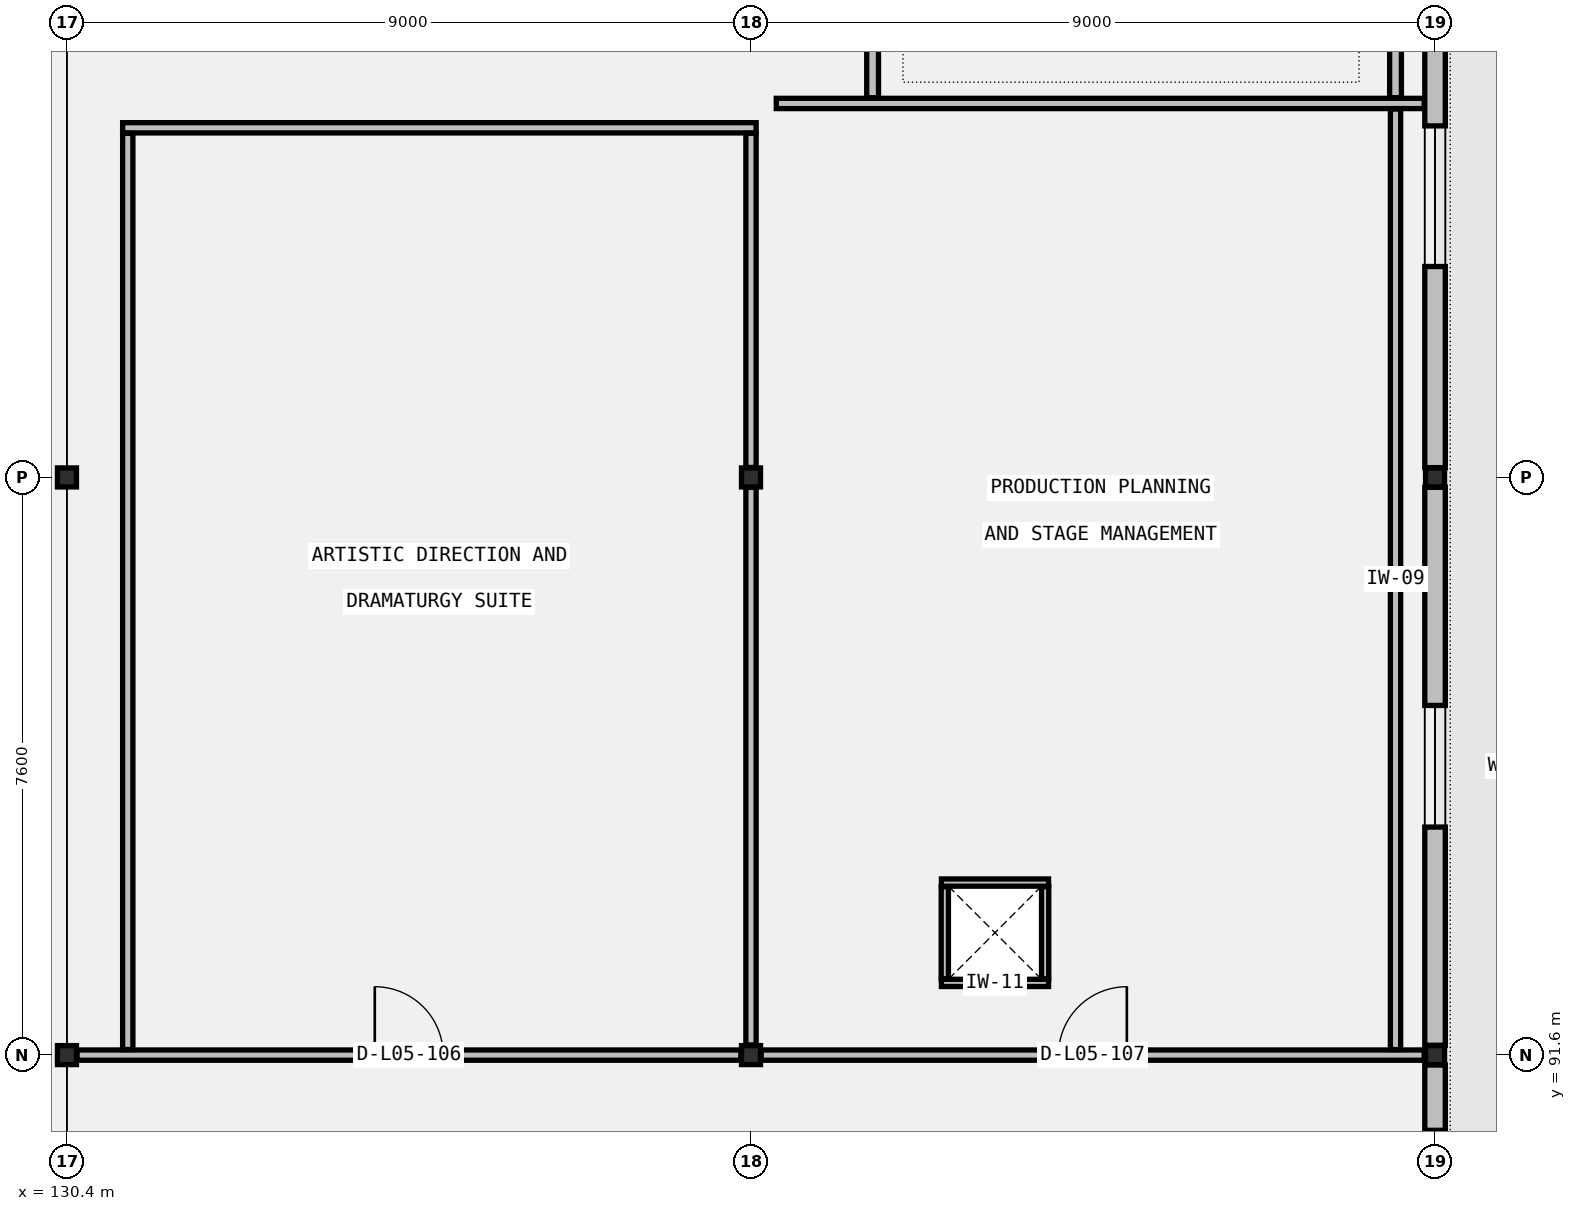
"""IFC4 building model, lengths in metres.
Left out: names, types, materials, properties, quantities, classifications, styles, units other than length and angle.
Written with IfcOpenShell. Run it as: python <this file> out.ifc"""

import sys

from ifc_helpers import new_model, si_unit, direction, frame, frame_2d, origin, origin_2d, place, context, subcontext, project, spatial, rectangle, i_section, extrude, element, fill, save


model = new_model("IFC4")
c1 = context("Model", 3, precision=1e-05, world=origin(), true_north=direction((0.0, 1.0)))
c2 = subcontext(c1, "Body", "Model", "MODEL_VIEW")
j1 = project(units=[si_unit("LENGTHUNIT", "METRE"), si_unit("PLANEANGLEUNIT", "RADIAN")], contexts=[c1])
p1 = place(None, origin())
s1 = spatial("IfcSite", under=j1, at=p1, CompositionType="ELEMENT")
p2 = place(p1, origin())
s2 = spatial("IfcBuilding", under=s1, at=p2, CompositionType="ELEMENT")
p3 = place(p2, frame((0.0, 0.0, 23.8)))
s3 = spatial("IfcBuildingStorey", under=s2, at=p3, CompositionType="ELEMENT", Elevation=23.8)
for number, where, z_axis, x_axis in (
    (1, (130.4, 91.6, 0.0), (0.0, 0.0, 1.0), (1.0, 0.0, 0.0)),
    (2, (130.4, 99.2, 0.0), (0.0, 0.0, 1.0), (1.0, 0.0, 0.0)),
    (3, (139.4, 91.6, 0.0), (0.0, 0.0, 1.0), (1.0, 0.0, 0.0)),
    (4, (139.4, 99.2, 0.0), (0.0, 0.0, 1.0), (1.0, 0.0, 0.0)),
    (5, (148.4, 91.6, 0.0), (0.0, 0.0, 1.0), (1.0, 0.0, 0.0)),
    (6, (148.4, 99.2, 0.0), (0.0, 0.0, 1.0), (1.0, 0.0, 0.0)),
):
    element("IfcColumn", number, at=place(p3, frame(where, z_axis=z_axis, x_axis=x_axis)), inside=s3, PredefinedType="COLUMN", context=c2, shape_type="SweptSolid", body=[
        extrude(i_section(OverallWidth=0.25, OverallDepth=0.25, WebThickness=0.009, FlangeThickness=0.014, FilletRadius=0.016, at=origin_2d()), origin(), (0.0, 0.0, 1.0), 4.8),
    ])
p4 = place(p3, frame((148.4, 87.9, 0.0), z_axis=(0.0, 0.0, 1.0), x_axis=(0.0, 1.0, 0.0)))
e7 = element("IfcWall", 7, at=p4, inside=s3, PredefinedType="STANDARD", context=c2, shape_type="SweptSolid", body=[
    extrude(rectangle(XDim=3.571, YDim=0.27, at=frame_2d((1.786, 0.0))), origin(), (0.0, 0.0, 1.0), 4.088),
])
p5 = place(p4, frame((0.861, 0.0, 0.95)))
e8 = element("IfcOpeningElement", 8, at=p5, cuts=e7, PredefinedType="OPENING", context=c2, shape_type="SweptSolid", body=[
    extrude(rectangle(XDim=1.85, YDim=1.25, at=frame_2d((0.925, 0.625))), frame((0.0, 0.145, 0.0), z_axis=(0.0, -1.0, 0.0), x_axis=(1.0, 0.0, 0.0)), (0.0, 0.0, 1.0), 0.29),
])
p6 = place(p3, frame((148.4, 91.729, 0.0), z_axis=(0.0, 0.0, 1.0), x_axis=(0.0, 1.0, 0.0)))
e9 = element("IfcWall", 9, at=p6, inside=s3, PredefinedType="STANDARD", context=c2, shape_type="SweptSolid", body=[
    extrude(rectangle(XDim=7.342, YDim=0.27, at=frame_2d((3.671, 0.0))), origin(), (0.0, 0.0, 1.0), 4.088),
])
p7 = place(p6, frame((2.871, 0.0, 0.95)))
e10 = element("IfcOpeningElement", 10, at=p7, cuts=e9, PredefinedType="OPENING", context=c2, shape_type="SweptSolid", body=[
    extrude(rectangle(XDim=1.6, YDim=1.8, at=frame_2d((0.8, 0.9))), frame((0.0, 0.145, 0.0), z_axis=(0.0, -1.0, 0.0), x_axis=(1.0, 0.0, 0.0)), (0.0, 0.0, 1.0), 0.29),
])
p8 = place(p3, frame((148.4, 99.329, 0.0), z_axis=(0.0, 0.0, 1.0), x_axis=(0.0, 1.0, 0.0)))
e11 = element("IfcWall", 11, at=p8, inside=s3, PredefinedType="STANDARD", context=c2, shape_type="SweptSolid", body=[
    extrude(rectangle(XDim=7.142, YDim=0.27, at=frame_2d((3.571, 0.0))), origin(), (0.0, 0.0, 1.0), 4.088),
])
p9 = place(p8, frame((2.646, 0.0, 0.95)))
e12 = element("IfcOpeningElement", 12, at=p9, cuts=e11, PredefinedType="OPENING", context=c2, shape_type="SweptSolid", body=[
    extrude(rectangle(XDim=1.85, YDim=1.25, at=frame_2d((0.925, 0.625))), frame((0.0, 0.145, 0.0), z_axis=(0.0, -1.0, 0.0), x_axis=(1.0, 0.0, 0.0)), (0.0, 0.0, 1.0), 0.29),
])
for number, where, z_axis, x_axis in (
    (13, (141.905, 92.55, 0.0), (0.0, 0.0, 1.0), (1.0, 0.0, 0.0)),
    (14, (141.905, 93.87, 0.0), (0.0, 0.0, 1.0), (1.0, 0.0, 0.0)),
):
    element("IfcWall", number, at=place(p3, frame(where, z_axis=z_axis, x_axis=x_axis)), inside=s3, PredefinedType="PARTITIONING", context=c2, shape_type="SweptSolid", body=[
        extrude(rectangle(XDim=1.41, YDim=0.095, at=frame_2d((0.705, 0.0))), origin(), (0.0, 0.0, 1.0), 4.56),
    ])
for number, where, z_axis, x_axis in (
    (15, (141.95, 92.605, 0.0), (0.0, 0.0, 1.0), (0.0, 1.0, 0.0)),
    (16, (143.27, 92.605, 0.0), (0.0, 0.0, 1.0), (0.0, 1.0, 0.0)),
):
    element("IfcWall", number, at=place(p3, frame(where, z_axis=z_axis, x_axis=x_axis)), inside=s3, PredefinedType="PARTITIONING", context=c2, shape_type="SweptSolid", body=[
        extrude(rectangle(XDim=1.21, YDim=0.095, at=frame_2d((0.605, 0.0))), origin(), (0.0, 0.0, 1.0), 4.56),
    ])
p10 = place(p3, frame((130.533, 91.6, 0.0), z_axis=(0.0, 0.0, 1.0), x_axis=(1.0, 0.0, 0.0)))
e17 = element("IfcWall", 17, at=p10, inside=s3, PredefinedType="PARTITIONING", context=c2, shape_type="SweptSolid", body=[
    extrude(rectangle(XDim=8.734, YDim=0.135, at=frame_2d((4.367, 0.0))), origin(), (0.0, 0.0, 1.0), 4.088),
])
p11 = place(p10, frame((3.917, 0.0, 0.0)))
e18 = element("IfcOpeningElement", 18, at=p11, cuts=e17, PredefinedType="OPENING", context=c2, shape_type="SweptSolid", body=[
    extrude(rectangle(XDim=0.9, YDim=2.08, at=frame_2d((0.45, 1.04))), frame((0.0, 0.077, 0.0), z_axis=(0.0, -1.0, 0.0), x_axis=(1.0, 0.0, 0.0)), (0.0, 0.0, 1.0), 0.155),
])
p12 = place(p3, frame((131.133, 103.8, 0.0), z_axis=(0.0, 0.0, 1.0), x_axis=(1.0, 0.0, 0.0)))
e19 = element("IfcWall", 19, at=p12, inside=s3, PredefinedType="PARTITIONING", context=c2, shape_type="SweptSolid", body=[
    extrude(rectangle(XDim=8.335, YDim=0.135, at=frame_2d((4.167, 0.0))), origin(), (0.0, 0.0, 1.0), 4.234),
])
p13 = place(p3, frame((139.4, 91.733, 0.0), z_axis=(0.0, 0.0, 1.0), x_axis=(0.0, 1.0, 0.0)))
e20 = element("IfcWall", 20, at=p13, inside=s3, PredefinedType="PARTITIONING", context=c2, shape_type="SweptSolid", body=[
    extrude(rectangle(XDim=7.336, YDim=0.135, at=frame_2d((3.668, 0.0))), origin(), (0.0, 0.0, 1.0), 4.088),
])
p14 = place(p3, frame((131.2, 91.674, 0.0), z_axis=(0.0, 0.0, 1.0), x_axis=(0.0, 1.0, 0.0)))
e21 = element("IfcWall", 21, at=p14, inside=s3, PredefinedType="PARTITIONING", context=c2, shape_type="SweptSolid", body=[
    extrude(rectangle(XDim=12.053, YDim=0.135, at=frame_2d((6.026, 0.0))), origin(), (0.0, 0.0, 1.0), 4.088),
])
p15 = place(p3, frame((139.4, 99.331, 0.0), z_axis=(0.0, 0.0, 1.0), x_axis=(0.0, 1.0, 0.0)))
e22 = element("IfcWall", 22, at=p15, inside=s3, PredefinedType="PARTITIONING", context=c2, shape_type="SweptSolid", body=[
    extrude(rectangle(XDim=4.396, YDim=0.135, at=frame_2d((2.198, 0.0))), origin(), (0.0, 0.0, 1.0), 4.088),
])
p16 = place(p3, frame((139.533, 91.6, 0.0), z_axis=(0.0, 0.0, 1.0), x_axis=(1.0, 0.0, 0.0)))
e23 = element("IfcWall", 23, at=p16, inside=s3, PredefinedType="PARTITIONING", context=c2, shape_type="SweptSolid", body=[
    extrude(rectangle(XDim=8.724, YDim=0.135, at=frame_2d((4.362, 0.0))), origin(), (0.0, 0.0, 1.0), 4.088),
])
p17 = place(p16, frame((3.912, 0.0, 0.0)))
e24 = element("IfcOpeningElement", 24, at=p17, cuts=e23, PredefinedType="OPENING", context=c2, shape_type="SweptSolid", body=[
    extrude(rectangle(XDim=0.9, YDim=2.08, at=frame_2d((0.45, 1.04))), frame((0.0, 0.077, 0.0), z_axis=(0.0, -1.0, 0.0), x_axis=(1.0, 0.0, 0.0)), (0.0, 0.0, 1.0), 0.155),
])
p18 = place(p3, frame((139.732, 104.12, 0.0), z_axis=(0.0, 0.0, 1.0), x_axis=(1.0, 0.0, 0.0)))
e25 = element("IfcWall", 25, at=p18, inside=s3, PredefinedType="PARTITIONING", context=c2, shape_type="SweptSolid", body=[
    extrude(rectangle(XDim=8.525, YDim=0.135, at=frame_2d((4.262, 0.0))), origin(), (0.0, 0.0, 1.0), 4.234),
])
p19 = place(p3, frame((147.88, 91.674, 0.0), z_axis=(0.0, 0.0, 1.0), x_axis=(0.0, 1.0, 0.0)))
e26 = element("IfcWall", 26, at=p19, inside=s3, PredefinedType="PARTITIONING", context=c2, shape_type="SweptSolid", body=[
    extrude(rectangle(XDim=12.373, YDim=0.135, at=frame_2d((6.187, 0.0))), origin(), (0.0, 0.0, 1.0), 4.088),
])
p20 = place(p3, frame((141.0, 104.196, 0.0), z_axis=(0.0, 0.0, 1.0), x_axis=(0.0, 1.0, 0.0)))
e27 = element("IfcWall", 27, at=p20, inside=s3, PredefinedType="PARTITIONING", context=c2, shape_type="SweptSolid", body=[
    extrude(rectangle(XDim=5.51, YDim=0.155, at=frame_2d((2.755, 0.0))), origin(), (0.0, 0.0, 1.0), 4.088),
])
p21 = place(p20, frame((2.295, 0.0, 0.0)))
e28 = element("IfcOpeningElement", 28, at=p21, cuts=e27, PredefinedType="OPENING", context=c2, shape_type="SweptSolid", body=[
    extrude(rectangle(XDim=0.92, YDim=2.12, at=frame_2d((0.46, 1.06))), frame((0.0, 0.087, 0.0), z_axis=(0.0, -1.0, 0.0), x_axis=(1.0, 0.0, 0.0)), (0.0, 0.0, 1.0), 0.175),
])
p22 = place(p3, frame((147.88, 104.196, 0.0), z_axis=(0.0, 0.0, 1.0), x_axis=(0.0, 1.0, 0.0)))
e29 = element("IfcWall", 29, at=p22, inside=s3, PredefinedType="PARTITIONING", context=c2, shape_type="SweptSolid", body=[
    extrude(rectangle(XDim=9.641, YDim=0.155, at=frame_2d((4.821, 0.0))), origin(), (0.0, 0.0, 1.0), 4.088),
])
p23 = place(p5, origin())
e30 = element("IfcWindow", 30, at=p23, inside=s3, PartitioningType="DOUBLE_PANEL_HORIZONTAL", PredefinedType="WINDOW", context=c2, shape_type="SweptSolid", body=[
    extrude(rectangle(XDim=1.85, YDim=1.25, at=frame_2d((0.925, 0.625))), frame((0.0, 0.03, 0.0), z_axis=(0.0, -1.0, 0.0), x_axis=(1.0, 0.0, 0.0)), (0.0, 0.0, 1.0), 0.06),
])
fill(e8, e30)
p24 = place(p7, origin())
e31 = element("IfcWindow", 31, at=p24, inside=s3, PartitioningType="DOUBLE_PANEL_VERTICAL", PredefinedType="WINDOW", context=c2, shape_type="SweptSolid", body=[
    extrude(rectangle(XDim=1.6, YDim=1.8, at=frame_2d((0.8, 0.9))), frame((0.0, 0.03, 0.0), z_axis=(0.0, -1.0, 0.0), x_axis=(1.0, 0.0, 0.0)), (0.0, 0.0, 1.0), 0.06),
])
fill(e10, e31)
p25 = place(p9, origin())
e32 = element("IfcWindow", 32, at=p25, inside=s3, PartitioningType="DOUBLE_PANEL_HORIZONTAL", PredefinedType="WINDOW", context=c2, shape_type="SweptSolid", body=[
    extrude(rectangle(XDim=1.85, YDim=1.25, at=frame_2d((0.925, 0.625))), frame((0.0, 0.03, 0.0), z_axis=(0.0, -1.0, 0.0), x_axis=(1.0, 0.0, 0.0)), (0.0, 0.0, 1.0), 0.06),
])
fill(e12, e32)
p26 = place(p11, origin())
e33 = element("IfcDoor", 33, at=p26, inside=s3, OperationType="SINGLE_SWING_LEFT", PredefinedType="DOOR", context=c2, shape_type="SweptSolid", body=[
    extrude(rectangle(XDim=0.9, YDim=2.08, at=frame_2d((0.45, 1.04))), frame((0.0, 0.025, 0.0), z_axis=(0.0, -1.0, 0.0), x_axis=(1.0, 0.0, 0.0)), (0.0, 0.0, 1.0), 0.05),
])
fill(e18, e33)
p27 = place(p17, origin())
e34 = element("IfcDoor", 34, at=p27, inside=s3, OperationType="SINGLE_SWING_RIGHT", PredefinedType="DOOR", context=c2, shape_type="SweptSolid", body=[
    extrude(rectangle(XDim=0.9, YDim=2.08, at=frame_2d((0.45, 1.04))), frame((0.0, 0.025, 0.0), z_axis=(0.0, -1.0, 0.0), x_axis=(1.0, 0.0, 0.0)), (0.0, 0.0, 1.0), 0.05),
])
fill(e24, e34)
save(model, sys.argv[1])
